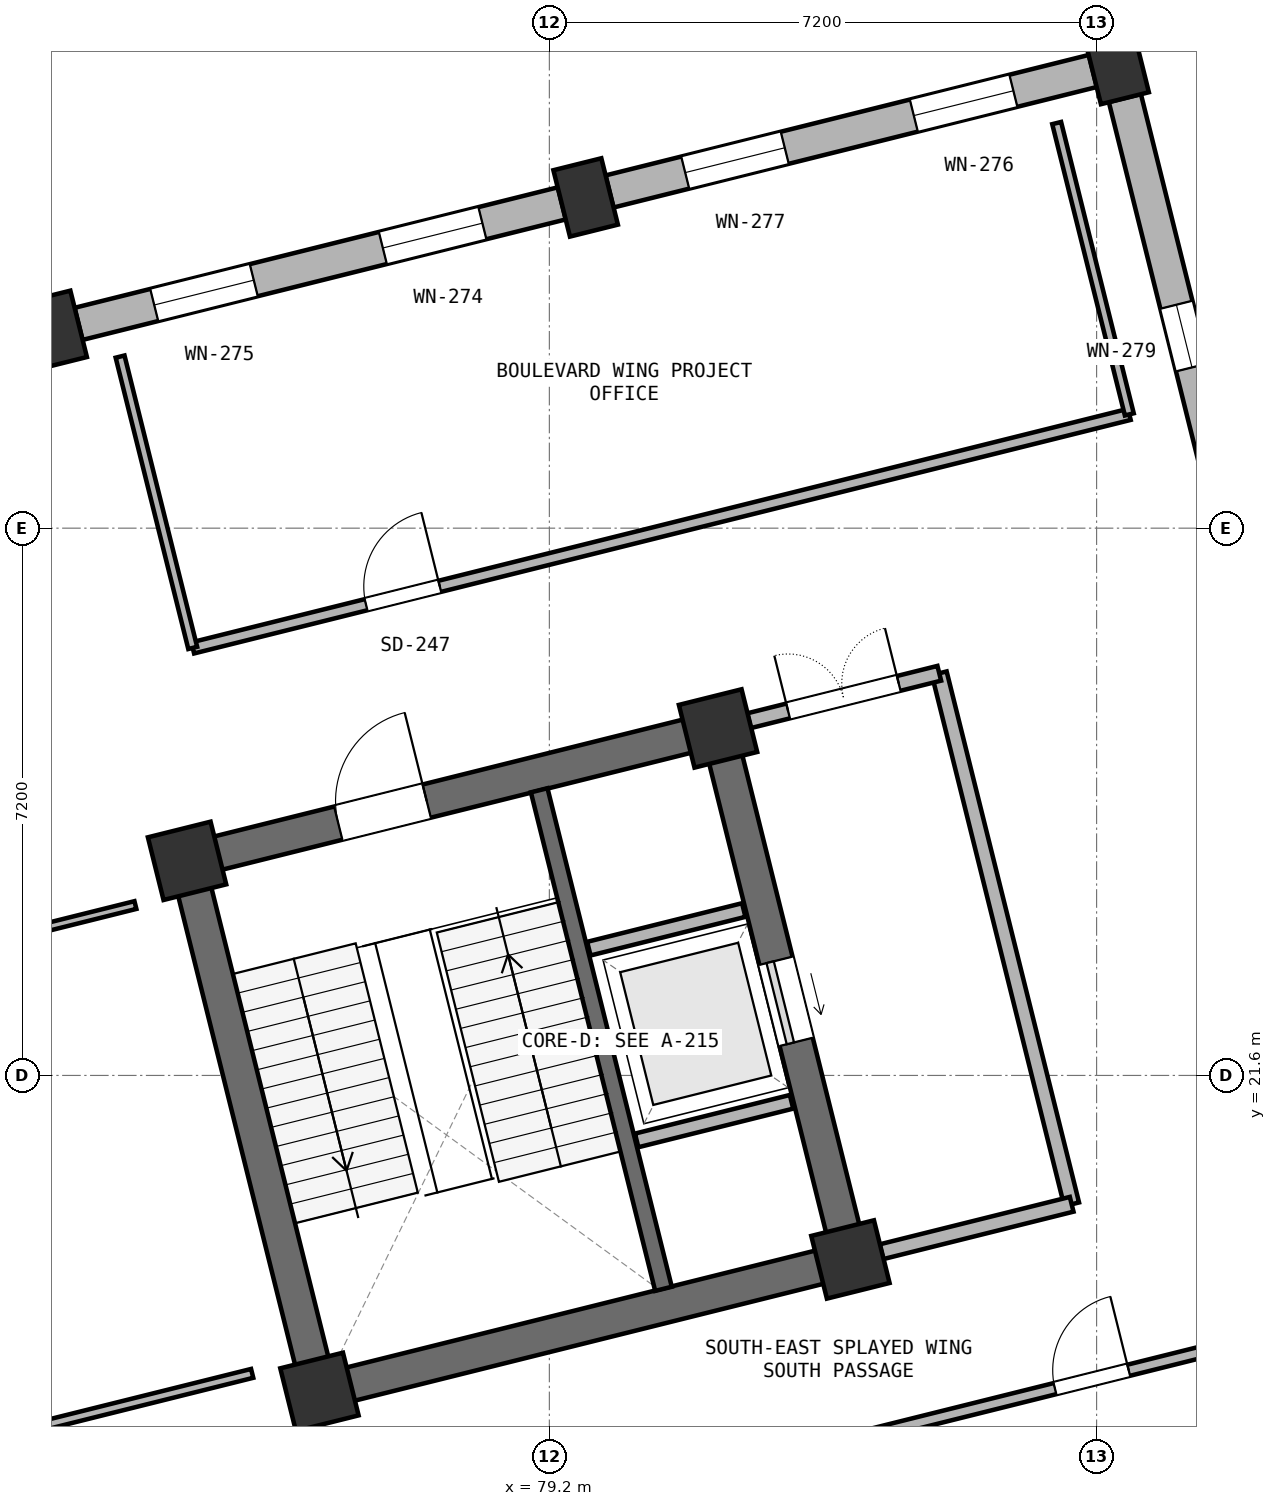
"""IFC4 building model, lengths in metres.
Left out: names, types, materials, properties, quantities, classifications, styles, units other than length and angle.
Written with IfcOpenShell. Run it as: python <this file> out.ifc"""

import sys

from ifc_helpers import new_model, si_unit, direction, frame, frame_2d, origin, origin_2d, place, context, subcontext, project, spatial, rectangle, extrude, element, fill, save


model = new_model("IFC4")
c1 = context("Model", 3, precision=1e-05, world=origin(), true_north=direction((0.0, 1.0)))
c2 = subcontext(c1, "Body", "Model", "MODEL_VIEW")
j1 = project(units=[si_unit("LENGTHUNIT", "METRE"), si_unit("PLANEANGLEUNIT", "RADIAN")], contexts=[c1])
p1 = place(None, origin())
s1 = spatial("IfcSite", under=j1, at=p1, CompositionType="ELEMENT")
p2 = place(p1, origin())
s2 = spatial("IfcBuilding", under=s1, at=p2, CompositionType="ELEMENT")
p3 = place(p2, frame((0.0, 0.0, 5.4)))
s3 = spatial("IfcBuildingStorey", under=s2, at=p3, CompositionType="ELEMENT", Elevation=5.4)
for number, where, z_axis, x_axis in (
    (1, (76.175, 17.437, 0.0), (0.0, 0.0, 1.0), (0.97, 0.242, 0.0)),
    (2, (74.433, 24.423, 0.0), (0.0, 0.0, 1.0), (0.97, 0.242, 0.0)),
):
    element("IfcColumn", number, at=place(p3, frame(where, z_axis=z_axis, x_axis=x_axis)), inside=s3, PredefinedType="COLUMN", context=c2, shape_type="SweptSolid", body=[
        extrude(rectangle(XDim=0.85, YDim=0.85, at=origin_2d()), origin(), (0.0, 0.0, 1.0), 4.8),
    ])
p4 = place(p3, frame((72.691, 31.409, 0.0), z_axis=(0.0, 0.0, 1.0), x_axis=(0.970295726276, 0.2419218956, 0.0)))
e3 = element("IfcColumn", 3, at=p4, inside=s3, PredefinedType="COLUMN", context=c2, shape_type="SweptSolid", body=[
    extrude(rectangle(XDim=0.65, YDim=0.9, at=origin_2d()), origin(), (0.0, 0.0, 1.0), 4.8),
])
for number, where, z_axis, x_axis in (
    (4, (83.161, 19.179, 0.0), (0.0, 0.0, 1.0), (0.97, 0.242, 0.0)),
    (5, (81.419, 26.165, 0.0), (0.0, 0.0, 1.0), (0.97, 0.242, 0.0)),
):
    element("IfcColumn", number, at=place(p3, frame(where, z_axis=z_axis, x_axis=x_axis)), inside=s3, PredefinedType="COLUMN", context=c2, shape_type="SweptSolid", body=[
        extrude(rectangle(XDim=0.85, YDim=0.85, at=origin_2d()), origin(), (0.0, 0.0, 1.0), 4.8),
    ])
for number, where, z_axis, x_axis in (
    (6, (79.677, 33.151, 0.0), (0.0, 0.0, 1.0), (0.97, 0.242, 0.0)),
    (7, (86.664, 34.893, 0.0), (0.0, 0.0, 1.0), (0.97, 0.242, 0.0)),
):
    element("IfcColumn", number, at=place(p3, frame(where, z_axis=z_axis, x_axis=x_axis)), inside=s3, PredefinedType="COLUMN", context=c2, shape_type="SweptSolid", body=[
        extrude(rectangle(XDim=0.65, YDim=0.9, at=origin_2d()), origin(), (0.0, 0.0, 1.0), 4.8),
    ])
p5 = place(p3, frame((76.515, 17.522, 0.0), z_axis=(0.0, 0.0, 1.0), x_axis=(0.970294759049, 0.241925774902, 0.0)))
e8 = element("IfcWall", 8, at=p5, inside=s3, PredefinedType="SHEAR", context=c2, shape_type="SweptSolid", body=[
    extrude(rectangle(XDim=6.5, YDim=0.45, at=frame_2d((3.25, 0.0))), origin(), (0.0, 0.0, 1.0), 4.8),
])
p6 = place(p3, frame((83.076, 19.519, 0.0), z_axis=(0.0, 0.0, 1.0), x_axis=(-0.241925774902, 0.970294759049, 0.0)))
e9 = element("IfcWall", 9, at=p6, inside=s3, PredefinedType="SHEAR", context=c2, shape_type="SweptSolid", body=[
    extrude(rectangle(XDim=6.5, YDim=0.45, at=frame_2d((3.25, 0.0))), origin(), (0.0, 0.0, 1.0), 4.8),
])
p7 = place(p6, frame((2.6, 0.0, 0.0)))
e10 = element("IfcOpeningElement", 10, at=p7, cuts=e9, PredefinedType="OPENING", context=c2, shape_type="SweptSolid", body=[
    extrude(rectangle(XDim=1.1, YDim=2.2, at=frame_2d((0.55, 1.1))), frame((0.0, 0.235, 0.0), z_axis=(0.0, -1.0, 0.0), x_axis=(1.0, 0.0, 0.0)), (0.0, 0.0, 1.0), 0.47),
])
p8 = place(p3, frame((81.08, 26.081, 0.0), z_axis=(0.0, 0.0, 1.0), x_axis=(-0.970294759049, -0.241925774902, 0.0)))
e11 = element("IfcWall", 11, at=p8, inside=s3, PredefinedType="SHEAR", context=c2, shape_type="SweptSolid", body=[
    extrude(rectangle(XDim=6.5, YDim=0.45, at=frame_2d((3.25, 0.0))), origin(), (0.0, 0.0, 1.0), 4.8),
])
p9 = place(p8, frame((3.6, 0.0, 0.0)))
e12 = element("IfcOpeningElement", 12, at=p9, cuts=e11, PredefinedType="OPENING", context=c2, shape_type="SweptSolid", body=[
    extrude(rectangle(XDim=1.2, YDim=2.2, at=frame_2d((0.6, 1.1))), frame((0.0, 0.235, 0.0), z_axis=(0.0, -1.0, 0.0), x_axis=(1.0, 0.0, 0.0)), (0.0, 0.0, 1.0), 0.47),
])
p10 = place(p3, frame((74.518, 24.084, 0.0), z_axis=(0.0, 0.0, 1.0), x_axis=(0.241925774902, -0.970294759049, 0.0)))
e13 = element("IfcWall", 13, at=p10, inside=s3, PredefinedType="SHEAR", context=c2, shape_type="SweptSolid", body=[
    extrude(rectangle(XDim=6.5, YDim=0.45, at=frame_2d((3.25, 0.0))), origin(), (0.0, 0.0, 1.0), 4.8),
])
p11 = place(p3, frame((80.701, 18.792, 0.0), z_axis=(0.0, 0.0, 1.0), x_axis=(-0.241898249226, 0.970301621673, 0.0)))
e14 = element("IfcWall", 14, at=p11, inside=s3, PredefinedType="SHEAR", context=c2, shape_type="SweptSolid", body=[
    extrude(rectangle(XDim=6.76, YDim=0.225, at=frame_2d((3.38, 0.0))), origin(), (0.0, 0.0, 1.0), 4.8),
])
for number, where, z_axis, x_axis in (
    (15, (80.349, 20.745, 0.0), (0.0, 0.0, 1.0), (0.97, 0.242, 0.0)),
    (16, (79.72, 23.268, 0.0), (0.0, 0.0, 1.0), (0.97, 0.242, 0.0)),
):
    element("IfcWall", number, at=place(p3, frame(where, z_axis=z_axis, x_axis=x_axis)), inside=s3, PredefinedType="PARTITIONING", context=c2, shape_type="SweptSolid", body=[
        extrude(rectangle(XDim=2.1, YDim=0.185, at=frame_2d((1.05, 0.0))), origin(), (0.0, 0.0, 1.0), 4.8),
    ])
p12 = place(p3, frame((79.364, 33.073, 0.0), z_axis=(0.0, 0.0, 1.0), x_axis=(-0.970300061562, -0.241904507055, 0.0)))
e17 = element("IfcWall", 17, at=p12, inside=s3, PredefinedType="SOLIDWALL", context=c2, shape_type="SweptSolid", body=[
    extrude(rectangle(XDim=6.554, YDim=0.435, at=frame_2d((3.277, 0.0))), origin(), (0.0, 0.0, 1.0), 3.5),
])
p13 = place(p12, frame((1.077, 0.0, 0.65)))
e18 = element("IfcOpeningElement", 18, at=p13, cuts=e17, PredefinedType="OPENING", context=c2, shape_type="SweptSolid", body=[
    extrude(rectangle(XDim=1.35, YDim=2.4, at=frame_2d((0.675, 1.2))), frame((0.0, 0.228, 0.0), z_axis=(0.0, -1.0, 0.0), x_axis=(1.0, 0.0, 0.0)), (0.0, 0.0, 1.0), 0.455),
])
p14 = place(p12, frame((4.177, 0.0, 0.65)))
e19 = element("IfcOpeningElement", 19, at=p14, cuts=e17, PredefinedType="OPENING", context=c2, shape_type="SweptSolid", body=[
    extrude(rectangle(XDim=1.35, YDim=2.4, at=frame_2d((0.675, 1.2))), frame((0.0, 0.228, 0.0), z_axis=(0.0, -1.0, 0.0), x_axis=(1.0, 0.0, 0.0)), (0.0, 0.0, 1.0), 0.455),
])
p15 = place(p3, frame((86.35, 34.815, 0.0), z_axis=(0.0, 0.0, 1.0), x_axis=(-0.970300061562, -0.241904507055, 0.0)))
e20 = element("IfcWall", 20, at=p15, inside=s3, PredefinedType="SOLIDWALL", context=c2, shape_type="SweptSolid", body=[
    extrude(rectangle(XDim=6.554, YDim=0.435, at=frame_2d((3.277, 0.0))), origin(), (0.0, 0.0, 1.0), 3.5),
])
p16 = place(p15, frame((1.077, 0.0, 0.65)))
e21 = element("IfcOpeningElement", 21, at=p16, cuts=e20, PredefinedType="OPENING", context=c2, shape_type="SweptSolid", body=[
    extrude(rectangle(XDim=1.35, YDim=2.4, at=frame_2d((0.675, 1.2))), frame((0.0, 0.228, 0.0), z_axis=(0.0, -1.0, 0.0), x_axis=(1.0, 0.0, 0.0)), (0.0, 0.0, 1.0), 0.455),
])
p17 = place(p15, frame((4.177, 0.0, 0.65)))
e22 = element("IfcOpeningElement", 22, at=p17, cuts=e20, PredefinedType="OPENING", context=c2, shape_type="SweptSolid", body=[
    extrude(rectangle(XDim=1.35, YDim=2.4, at=frame_2d((0.675, 1.2))), frame((0.0, 0.228, 0.0), z_axis=(0.0, -1.0, 0.0), x_axis=(1.0, 0.0, 0.0)), (0.0, 0.0, 1.0), 0.455),
])
p18 = place(p3, frame((88.297, 28.342, 0.0), z_axis=(0.0, 0.0, 1.0), x_axis=(-0.241888603038, 0.970304026437, 0.0)))
e23 = element("IfcWall", 23, at=p18, inside=s3, PredefinedType="SOLIDWALL", context=c2, shape_type="SweptSolid", body=[
    extrude(rectangle(XDim=6.304, YDim=0.435, at=frame_2d((3.152, 0.0))), origin(), (0.0, 0.0, 1.0), 3.5),
])
p19 = place(p18, frame((2.652, 0.0, 0.7)))
e24 = element("IfcOpeningElement", 24, at=p19, cuts=e23, PredefinedType="OPENING", context=c2, shape_type="SweptSolid", body=[
    extrude(rectangle(XDim=0.85, YDim=2.2, at=frame_2d((0.425, 1.1))), frame((0.0, 0.228, 0.0), z_axis=(0.0, -1.0, 0.0), x_axis=(1.0, 0.0, 0.0)), (0.0, 0.0, 1.0), 0.455),
])
p20 = place(p3, frame((86.072, 19.905, 0.0), z_axis=(0.0, 0.0, 1.0), x_axis=(-0.241937193493, 0.970291911955, 0.0)))
e25 = element("IfcWall", 25, at=p20, inside=s3, PredefinedType="PARTITIONING", context=c2, shape_type="SweptSolid", body=[
    extrude(rectangle(XDim=7.2, YDim=0.2, at=frame_2d((3.6, 0.0))), origin(), (0.0, 0.0, 1.0), 3.52),
])
p21 = place(p3, frame((83.569, 19.281, 0.0), z_axis=(0.0, 0.0, 1.0), x_axis=(0.970287048366, 0.241956698135, 0.0)))
e26 = element("IfcWall", 26, at=p21, inside=s3, PredefinedType="PARTITIONING", context=c2, shape_type="SweptSolid", body=[
    extrude(rectangle(XDim=2.58, YDim=0.2, at=frame_2d((1.29, 0.0))), origin(), (0.0, 0.0, 1.0), 3.52),
])
p22 = place(p3, frame((84.33, 26.891, 0.0), z_axis=(0.0, 0.0, 1.0), x_axis=(-0.970309259708, -0.2418676095, 0.0)))
e27 = element("IfcWall", 27, at=p22, inside=s3, PredefinedType="PARTITIONING", context=c2, shape_type="SweptSolid", body=[
    extrude(rectangle(XDim=2.58, YDim=0.2, at=frame_2d((1.29, 0.0))), origin(), (0.0, 0.0, 1.0), 3.52),
])
p23 = place(p22, frame((0.55, 0.0, 0.0)))
e28 = element("IfcOpeningElement", 28, at=p23, cuts=e27, PredefinedType="OPENING", context=c2, shape_type="SweptSolid", body=[
    extrude(rectangle(XDim=1.5, YDim=2.2, at=frame_2d((0.75, 1.1))), frame((0.0, 0.11, 0.0), z_axis=(0.0, -1.0, 0.0), x_axis=(1.0, 0.0, 0.0)), (0.0, 0.0, 1.0), 0.22),
])
p24 = place(p3, frame((82.699, 16.693, 0.0), z_axis=(0.0, 0.0, 1.0), x_axis=(0.970293585014, 0.241930483572, 0.0)))
e29 = element("IfcWall", 29, at=p24, inside=s3, PredefinedType="PARTITIONING", context=c2, shape_type="SweptSolid", body=[
    extrude(rectangle(XDim=7.5, YDim=0.15, at=frame_2d((3.75, 0.0))), origin(), (0.0, 0.0, 1.0), 3.52),
])
p25 = place(p24, frame((3.25, 0.0, 0.0)))
e30 = element("IfcOpeningElement", 30, at=p25, cuts=e29, PredefinedType="OPENING", context=c2, shape_type="SweptSolid", body=[
    extrude(rectangle(XDim=1.0, YDim=2.2, at=frame_2d((0.5, 1.1))), frame((0.0, 0.085, 0.0), z_axis=(0.0, -1.0, 0.0), x_axis=(1.0, 0.0, 0.0)), (0.0, 0.0, 1.0), 0.17),
])
p26 = place(p3, frame((73.754, 23.842, 0.0), z_axis=(0.0, 0.0, 1.0), x_axis=(-0.970295954135, -0.241920981706, 0.0)))
e31 = element("IfcWall", 31, at=p26, inside=s3, PredefinedType="PARTITIONING", context=c2, shape_type="SweptSolid", body=[
    extrude(rectangle(XDim=18.6, YDim=0.105, at=frame_2d((9.3, 0.0))), origin(), (0.0, 0.0, 1.0), 3.52),
])
p27 = place(p26, frame((9.2, 0.0, 0.0)))
e32 = element("IfcOpeningElement", 32, at=p27, cuts=e31, PredefinedType="OPENING", context=c2, shape_type="SweptSolid", body=[
    extrude(rectangle(XDim=1.6, YDim=2.2, at=frame_2d((0.8, 1.1))), frame((0.0, 0.062, 0.0), z_axis=(0.0, -1.0, 0.0), x_axis=(1.0, 0.0, 0.0)), (0.0, 0.0, 1.0), 0.125),
])
p28 = place(p3, frame((57.242, 13.18, 0.0), z_axis=(0.0, 0.0, 1.0), x_axis=(0.970295185925, 0.24192406282, 0.0)))
e33 = element("IfcWall", 33, at=p28, inside=s3, PredefinedType="PARTITIONING", context=c2, shape_type="SweptSolid", body=[
    extrude(rectangle(XDim=18.6, YDim=0.12, at=frame_2d((9.3, 0.0))), origin(), (0.0, 0.0, 1.0), 3.52),
])
p29 = place(p3, frame((74.508, 27.225, 0.0), z_axis=(0.0, 0.0, 1.0), x_axis=(0.970298350757, 0.241911369139, 0.0)))
e34 = element("IfcWall", 34, at=p29, inside=s3, PredefinedType="PARTITIONING", context=c2, shape_type="SweptSolid", body=[
    extrude(rectangle(XDim=12.7, YDim=0.15, at=frame_2d((6.35, 0.0))), origin(), (0.0, 0.0, 1.0), 3.52),
])
p30 = place(p29, frame((2.35, 0.0, 0.0)))
e35 = element("IfcOpeningElement", 35, at=p30, cuts=e34, PredefinedType="OPENING", context=c2, shape_type="SweptSolid", body=[
    extrude(rectangle(XDim=1.0, YDim=2.15, at=frame_2d((0.5, 1.075))), frame((0.0, 0.085, 0.0), z_axis=(0.0, -1.0, 0.0), x_axis=(1.0, 0.0, 0.0)), (0.0, 0.0, 1.0), 0.17),
])
p31 = place(p3, frame((74.508, 27.225, 0.0), z_axis=(0.0, 0.0, 1.0), x_axis=(-0.241924747697, 0.970295015164, 0.0)))
e36 = element("IfcWall", 36, at=p31, inside=s3, PredefinedType="PARTITIONING", context=c2, shape_type="SweptSolid", body=[
    extrude(rectangle(XDim=3.95, YDim=0.12, at=frame_2d((1.975, 0.0))), origin(), (0.0, 0.0, 1.0), 3.52),
])
p32 = place(p3, frame((85.875, 34.13, 0.0), z_axis=(0.0, 0.0, 1.0), x_axis=(0.241910239337, -0.970298632434, 0.0)))
e37 = element("IfcWall", 37, at=p32, inside=s3, PredefinedType="PARTITIONING", context=c2, shape_type="SweptSolid", body=[
    extrude(rectangle(XDim=3.95, YDim=0.12, at=frame_2d((1.975, 0.0))), origin(), (0.0, 0.0, 1.0), 3.52),
])
p33 = place(p7, origin())
e38 = element("IfcDoor", 38, at=p33, inside=s3, OperationType="SLIDING_TO_LEFT", PredefinedType="DOOR", context=c2, shape_type="SweptSolid", body=[
    extrude(rectangle(XDim=1.1, YDim=2.2, at=frame_2d((0.55, 1.1))), frame((0.0, 0.025, 0.0), z_axis=(0.0, -1.0, 0.0), x_axis=(1.0, 0.0, 0.0)), (0.0, 0.0, 1.0), 0.05),
])
fill(e10, e38)
p34 = place(p13, origin())
e39 = element("IfcWindow", 39, at=p34, inside=s3, PartitioningType="DOUBLE_PANEL_VERTICAL", PredefinedType="WINDOW", context=c2, shape_type="SweptSolid", body=[
    extrude(rectangle(XDim=1.35, YDim=2.4, at=frame_2d((0.675, 1.2))), frame((0.0, 0.03, 0.0), z_axis=(0.0, -1.0, 0.0), x_axis=(1.0, 0.0, 0.0)), (0.0, 0.0, 1.0), 0.06),
])
fill(e18, e39)
p35 = place(p14, origin())
e40 = element("IfcWindow", 40, at=p35, inside=s3, PartitioningType="DOUBLE_PANEL_VERTICAL", PredefinedType="WINDOW", context=c2, shape_type="SweptSolid", body=[
    extrude(rectangle(XDim=1.35, YDim=2.4, at=frame_2d((0.675, 1.2))), frame((0.0, 0.03, 0.0), z_axis=(0.0, -1.0, 0.0), x_axis=(1.0, 0.0, 0.0)), (0.0, 0.0, 1.0), 0.06),
])
fill(e19, e40)
p36 = place(p16, origin())
e41 = element("IfcWindow", 41, at=p36, inside=s3, PartitioningType="DOUBLE_PANEL_VERTICAL", PredefinedType="WINDOW", context=c2, shape_type="SweptSolid", body=[
    extrude(rectangle(XDim=1.35, YDim=2.4, at=frame_2d((0.675, 1.2))), frame((0.0, 0.03, 0.0), z_axis=(0.0, -1.0, 0.0), x_axis=(1.0, 0.0, 0.0)), (0.0, 0.0, 1.0), 0.06),
])
fill(e21, e41)
p37 = place(p17, origin())
e42 = element("IfcWindow", 42, at=p37, inside=s3, PartitioningType="DOUBLE_PANEL_VERTICAL", PredefinedType="WINDOW", context=c2, shape_type="SweptSolid", body=[
    extrude(rectangle(XDim=1.35, YDim=2.4, at=frame_2d((0.675, 1.2))), frame((0.0, 0.03, 0.0), z_axis=(0.0, -1.0, 0.0), x_axis=(1.0, 0.0, 0.0)), (0.0, 0.0, 1.0), 0.06),
])
fill(e22, e42)
p38 = place(p19, origin())
e43 = element("IfcWindow", 43, at=p38, inside=s3, PartitioningType="SINGLE_PANEL", PredefinedType="WINDOW", context=c2, shape_type="SweptSolid", body=[
    extrude(rectangle(XDim=0.85, YDim=2.2, at=frame_2d((0.425, 1.1))), frame((0.0, 0.03, 0.0), z_axis=(0.0, -1.0, 0.0), x_axis=(1.0, 0.0, 0.0)), (0.0, 0.0, 1.0), 0.06),
])
fill(e24, e43)
p39 = place(p9, frame((1.2, 0.0, 0.0), z_axis=(0.0, 0.0, 1.0), x_axis=(-1.0, 0.0, 0.0)))
e44 = element("IfcDoor", 44, at=p39, inside=s3, OperationType="SINGLE_SWING_RIGHT", PredefinedType="DOOR", context=c2, shape_type="SweptSolid", body=[
    extrude(rectangle(XDim=1.2, YDim=2.2, at=frame_2d((0.6, 1.1))), frame((0.0, 0.025, 0.0), z_axis=(0.0, -1.0, 0.0), x_axis=(1.0, 0.0, 0.0)), (0.0, 0.0, 1.0), 0.05),
])
fill(e12, e44)
p40 = place(p23, frame((1.5, 0.0, 0.0), z_axis=(0.0, 0.0, 1.0), x_axis=(-1.0, 0.0, 0.0)))
e45 = element("IfcDoor", 45, at=p40, inside=s3, OperationType="DOUBLE_DOOR_SINGLE_SWING", PredefinedType="DOOR", context=c2, shape_type="SweptSolid", body=[
    extrude(rectangle(XDim=1.5, YDim=2.2, at=frame_2d((0.75, 1.1))), frame((0.0, 0.025, 0.0), z_axis=(0.0, -1.0, 0.0), x_axis=(1.0, 0.0, 0.0)), (0.0, 0.0, 1.0), 0.05),
])
fill(e28, e45)
p41 = place(p25, origin())
e46 = element("IfcDoor", 46, at=p41, inside=s3, OperationType="SINGLE_SWING_RIGHT", PredefinedType="DOOR", context=c2, shape_type="SweptSolid", body=[
    extrude(rectangle(XDim=1.0, YDim=2.2, at=frame_2d((0.5, 1.1))), frame((0.0, 0.025, 0.0), z_axis=(0.0, -1.0, 0.0), x_axis=(1.0, 0.0, 0.0)), (0.0, 0.0, 1.0), 0.05),
])
fill(e30, e46)
p42 = place(p30, origin())
e47 = element("IfcDoor", 47, at=p42, inside=s3, OperationType="SINGLE_SWING_RIGHT", PredefinedType="DOOR", context=c2, shape_type="SweptSolid", body=[
    extrude(rectangle(XDim=1.0, YDim=2.15, at=frame_2d((0.5, 1.075))), frame((0.0, 0.025, 0.0), z_axis=(0.0, -1.0, 0.0), x_axis=(1.0, 0.0, 0.0)), (0.0, 0.0, 1.0), 0.05),
])
fill(e35, e47)
save(model, sys.argv[1])
